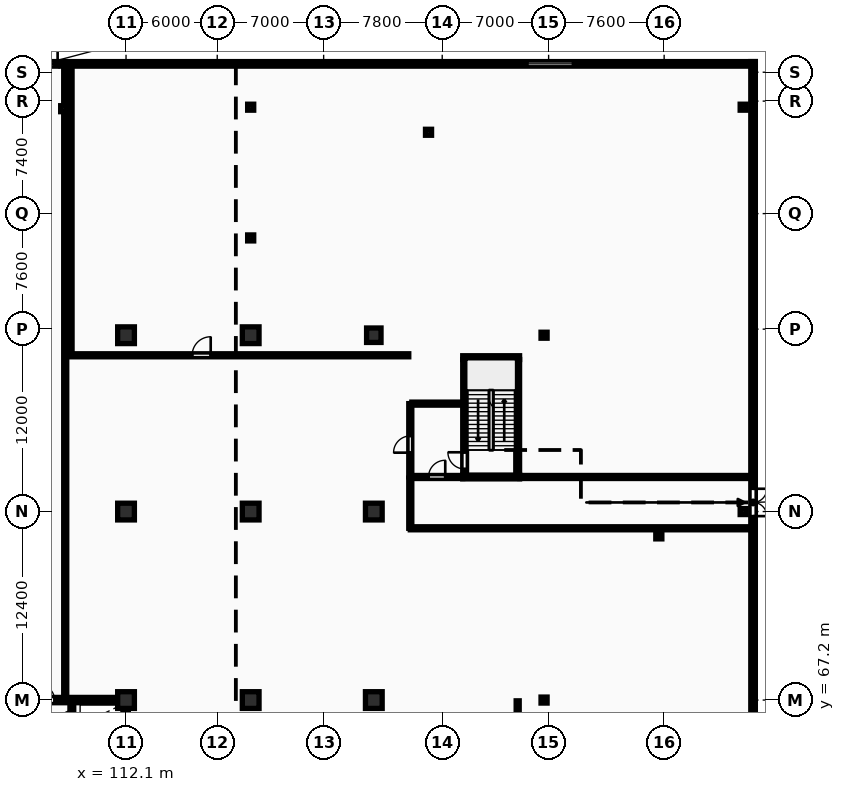
"""IFC4 building model, lengths in metres.
Left out: names, types, materials, properties, quantities, classifications, styles, units other than length and angle.
Written with IfcOpenShell. Run it as: python <this file> out.ifc"""

import sys

from ifc_helpers import new_model, si_unit, direction, frame, frame_2d, origin, origin_2d, place, context, subcontext, project, spatial, rectangle, circle, i_section, extrude, element, fill, save


model = new_model("IFC4")
c1 = context("Model", 3, precision=1e-05, world=origin(), true_north=direction((0.0, 1.0)))
c2 = subcontext(c1, "Body", "Model", "MODEL_VIEW")
j1 = project(units=[si_unit("LENGTHUNIT", "METRE"), si_unit("PLANEANGLEUNIT", "RADIAN")], contexts=[c1])
p1 = place(None, origin())
s1 = spatial("IfcSite", under=j1, at=p1, CompositionType="ELEMENT")
p2 = place(p1, origin())
s2 = spatial("IfcBuilding", under=s1, at=p2, CompositionType="ELEMENT")
p3 = place(p2, origin())
s3 = spatial("IfcBuildingStorey", under=s2, at=p3, CompositionType="ELEMENT", Elevation=0.0)
for number, where, z_axis, x_axis in (
    (1, (112.1, 67.2, 0.0), (0.0, 0.0, 1.0), (1.0, 0.0, 0.0)),
    (2, (112.1, 79.6, 0.0), (0.0, 0.0, 1.0), (1.0, 0.0, 0.0)),
    (3, (112.1, 91.2, 0.0), (0.0, 0.0, 1.0), (1.0, 0.0, 0.0)),
    (4, (120.3, 67.2, 0.0), (0.0, 0.0, 1.0), (1.0, 0.0, 0.0)),
    (5, (120.3, 79.6, 0.0), (0.0, 0.0, 1.0), (1.0, 0.0, 0.0)),
    (6, (120.3, 91.2, 0.0), (0.0, 0.0, 1.0), (1.0, 0.0, 0.0)),
    (7, (128.4, 67.2, 0.0), (0.0, 0.0, 1.0), (1.0, 0.0, 0.0)),
    (8, (128.4, 79.6, 0.0), (0.0, 0.0, 1.0), (1.0, 0.0, 0.0)),
):
    element("IfcColumn", number, at=place(p3, frame(where, z_axis=z_axis, x_axis=x_axis)), inside=s3, PredefinedType="COLUMN", context=c2, shape_type="SweptSolid", body=[
        extrude(rectangle(XDim=1.1, YDim=1.1, at=origin_2d()), origin(), (0.0, 0.0, 1.0), 5.4),
    ])
p4 = place(p3, frame((128.4, 91.2, 0.0), z_axis=(0.0, 0.0, 1.0), x_axis=(1.0, 0.0, 0.0)))
e9 = element("IfcColumn", 9, at=p4, inside=s3, PredefinedType="COLUMN", context=c2, shape_type="SweptSolid", body=[
    extrude(circle(Radius=0.475, at=origin_2d()), origin(), (0.0, 0.0, 1.0), 5.4),
])
for number, where, z_axis, x_axis in (
    (10, (139.6, 67.2, 0.0), (0.0, 0.0, 1.0), (1.0, 0.0, 0.0)),
    (11, (139.6, 91.2, 0.0), (0.0, 0.0, 1.0), (1.0, 0.0, 0.0)),
    (12, (120.3, 97.6, 0.0), (0.0, 0.0, 1.0), (1.0, 0.0, 0.0)),
    (13, (108.0, 106.1, 0.0), (0.0, 0.0, 1.0), (1.0, 0.0, 0.0)),
    (14, (132.0, 104.55, 0.0), (0.0, 0.0, 1.0), (1.0, 0.0, 0.0)),
    (15, (147.15, 78.0, 0.0), (0.0, 0.0, 1.0), (1.0, 0.0, 0.0)),
    (16, (152.7, 79.6, 0.0), (0.0, 0.0, 1.0), (1.0, 0.0, 0.0)),
    (17, (152.7, 106.2, 0.0), (0.0, 0.0, 1.0), (1.0, 0.0, 0.0)),
    (18, (120.3, 106.2, 0.0), (0.0, 0.0, 1.0), (1.0, 0.0, 0.0)),
):
    element("IfcColumn", number, at=place(p3, frame(where, z_axis=z_axis, x_axis=x_axis)), inside=s3, PredefinedType="COLUMN", context=c2, shape_type="SweptSolid", body=[
        extrude(i_section(OverallWidth=0.399, OverallDepth=0.394, WebThickness=0.023, FlangeThickness=0.037, FilletRadius=0.015, at=origin_2d()), origin(), (0.0, 0.0, 1.0), 5.4),
    ])
p5 = place(p3, frame((153.5, 109.05, 0.0), z_axis=(0.0, 0.0, 1.0), x_axis=(-1.0, 0.0, 0.0)))
e19 = element("IfcWall", 19, at=p5, inside=s3, PredefinedType="STANDARD", context=c2, shape_type="SweptSolid", body=[
    extrude(rectangle(XDim=48.6, YDim=0.3, at=frame_2d((24.3, 0.0))), origin(), (0.0, 0.0, 1.0), 5.1),
])
p6 = place(p5, frame((45.9, 0.0, 0.0)))
e20 = element("IfcOpeningElement", 20, at=p6, cuts=e19, PredefinedType="OPENING", context=c2, shape_type="SweptSolid", body=[
    extrude(rectangle(XDim=1.8, YDim=2.2, at=frame_2d((0.9, 1.1))), frame((0.0, 0.16, 0.0), z_axis=(0.0, -1.0, 0.0), x_axis=(1.0, 0.0, 0.0)), (0.0, 0.0, 1.0), 0.32),
])
p7 = place(p5, frame((12.0, 0.0, 0.9)))
e21 = element("IfcOpeningElement", 21, at=p7, cuts=e19, PredefinedType="OPENING", context=c2, shape_type="SweptSolid", body=[
    extrude(rectangle(XDim=3.0, YDim=2.6, at=frame_2d((1.5, 1.3))), frame((0.0, 0.16, 0.0), z_axis=(0.0, -1.0, 0.0), x_axis=(1.0, 0.0, 0.0)), (0.0, 0.0, 1.0), 0.32),
])
p8 = place(p3, frame((153.35, -26.5, 0.0), z_axis=(0.0, 0.0, 1.0), x_axis=(0.0, 1.0, 0.0)))
e22 = element("IfcWall", 22, at=p8, inside=s3, PredefinedType="STANDARD", context=c2, shape_type="SweptSolid", body=[
    extrude(rectangle(XDim=135.7, YDim=0.3, at=frame_2d((67.85, 0.0))), origin(), (0.0, 0.0, 1.0), 5.1),
])
p9 = place(p8, frame((60.8, 0.0, 0.0)))
e23 = element("IfcOpeningElement", 23, at=p9, cuts=e22, PredefinedType="OPENING", context=c2, shape_type="SweptSolid", body=[
    extrude(rectangle(XDim=7.2, YDim=3.2, at=frame_2d((3.6, 1.6))), frame((0.0, 0.16, 0.0), z_axis=(0.0, -1.0, 0.0), x_axis=(1.0, 0.0, 0.0)), (0.0, 0.0, 1.0), 0.32),
])
p10 = place(p8, frame((70.1, 0.0, 0.0)))
e24 = element("IfcOpeningElement", 24, at=p10, cuts=e22, PredefinedType="OPENING", context=c2, shape_type="SweptSolid", body=[
    extrude(rectangle(XDim=1.8, YDim=2.2, at=frame_2d((0.9, 1.1))), frame((0.0, 0.16, 0.0), z_axis=(0.0, -1.0, 0.0), x_axis=(1.0, 0.0, 0.0)), (0.0, 0.0, 1.0), 0.32),
])
p11 = place(p8, frame((77.5, 0.0, 0.0)))
e25 = element("IfcOpeningElement", 25, at=p11, cuts=e22, PredefinedType="OPENING", context=c2, shape_type="SweptSolid", body=[
    extrude(rectangle(XDim=4.2, YDim=3.6, at=frame_2d((2.1, 1.8))), frame((0.0, 0.16, 0.0), z_axis=(0.0, -1.0, 0.0), x_axis=(1.0, 0.0, 0.0)), (0.0, 0.0, 1.0), 0.32),
])
p12 = place(p8, frame((11.0, 0.0, 0.0)))
e26 = element("IfcOpeningElement", 26, at=p12, cuts=e22, PredefinedType="OPENING", context=c2, shape_type="SweptSolid", body=[
    extrude(rectangle(XDim=1.8, YDim=2.2, at=frame_2d((0.9, 1.1))), frame((0.0, 0.16, 0.0), z_axis=(0.0, -1.0, 0.0), x_axis=(1.0, 0.0, 0.0)), (0.0, 0.0, 1.0), 0.32),
])
p13 = place(p8, frame((105.8, 0.0, 0.0)))
e27 = element("IfcOpeningElement", 27, at=p13, cuts=e22, PredefinedType="OPENING", context=c2, shape_type="SweptSolid", body=[
    extrude(rectangle(XDim=1.8, YDim=2.2, at=frame_2d((0.9, 1.1))), frame((0.0, 0.16, 0.0), z_axis=(0.0, -1.0, 0.0), x_axis=(1.0, 0.0, 0.0)), (0.0, 0.0, 1.0), 0.32),
])
p14 = place(p3, frame((112.075, 55.375, 0.0), z_axis=(0.0, 0.0, 1.0), x_axis=(0.0, 1.0, 0.0)))
e28 = element("IfcWall", 28, at=p14, inside=s3, PredefinedType="SHEAR", context=c2, shape_type="SweptSolid", body=[
    extrude(rectangle(XDim=11.65, YDim=0.35, at=frame_2d((5.825, 0.0))), origin(), (0.0, 0.0, 1.0), 5.4),
])
p15 = place(p3, frame((75.95, 67.2, 0.0), z_axis=(0.0, 0.0, 1.0), x_axis=(1.0, 0.0, 0.0)))
e29 = element("IfcWall", 29, at=p15, inside=s3, PredefinedType="SHEAR", context=c2, shape_type="SweptSolid", body=[
    extrude(rectangle(XDim=36.3, YDim=0.35, at=frame_2d((18.15, 0.0))), origin(), (0.0, 0.0, 1.0), 5.4),
])
p16 = place(p15, frame((5.25, 0.0, 0.0)))
e30 = element("IfcOpeningElement", 30, at=p16, cuts=e29, PredefinedType="OPENING", context=c2, shape_type="SweptSolid", body=[
    extrude(rectangle(XDim=1.0, YDim=2.15, at=frame_2d((0.5, 1.075))), frame((0.0, 0.185, 0.0), z_axis=(0.0, -1.0, 0.0), x_axis=(1.0, 0.0, 0.0)), (0.0, 0.0, 1.0), 0.37),
])
p17 = place(p15, frame((21.6, 0.0, 0.0)))
e31 = element("IfcOpeningElement", 31, at=p17, cuts=e29, PredefinedType="OPENING", context=c2, shape_type="SweptSolid", body=[
    extrude(rectangle(XDim=1.5, YDim=2.2, at=frame_2d((0.75, 1.1))), frame((0.0, 0.185, 0.0), z_axis=(0.0, -1.0, 0.0), x_axis=(1.0, 0.0, 0.0)), (0.0, 0.0, 1.0), 0.37),
])
p18 = place(p15, frame((30.45, 0.0, 0.0)))
e32 = element("IfcOpeningElement", 32, at=p18, cuts=e29, PredefinedType="OPENING", context=c2, shape_type="SweptSolid", body=[
    extrude(rectangle(XDim=1.0, YDim=2.15, at=frame_2d((0.5, 1.075))), frame((0.0, 0.185, 0.0), z_axis=(0.0, -1.0, 0.0), x_axis=(1.0, 0.0, 0.0)), (0.0, 0.0, 1.0), 0.37),
])
p19 = place(p3, frame((108.535, 55.4, 0.0), z_axis=(0.0, 0.0, 1.0), x_axis=(0.0, 1.0, 0.0)))
e33 = element("IfcWall", 33, at=p19, inside=s3, PredefinedType="SHEAR", context=c2, shape_type="SweptSolid", body=[
    extrude(rectangle(XDim=11.6, YDim=0.25, at=frame_2d((5.8, 0.0))), origin(), (0.0, 0.0, 1.0), 5.4),
])
p20 = place(p19, frame((8.2, 0.0, 0.0)))
e34 = element("IfcOpeningElement", 34, at=p20, cuts=e33, PredefinedType="OPENING", context=c2, shape_type="SweptSolid", body=[
    extrude(rectangle(XDim=1.1, YDim=2.1, at=frame_2d((0.55, 1.05))), frame((0.0, 0.135, 0.0), z_axis=(0.0, -1.0, 0.0), x_axis=(1.0, 0.0, 0.0)), (0.0, 0.0, 1.0), 0.27),
])
p21 = place(p19, frame((10.25, 0.0, 0.0)))
e35 = element("IfcOpeningElement", 35, at=p21, cuts=e33, PredefinedType="OPENING", context=c2, shape_type="SweptSolid", body=[
    extrude(rectangle(XDim=0.85, YDim=2.05, at=frame_2d((0.425, 1.025))), frame((0.0, 0.135, 0.0), z_axis=(0.0, -1.0, 0.0), x_axis=(1.0, 0.0, 0.0)), (0.0, 0.0, 1.0), 0.27),
])
p22 = place(p3, frame((134.375, 82.0, 0.0), z_axis=(0.0, 0.0, 1.0), x_axis=(0.0, 1.0, 0.0)))
e36 = element("IfcWall", 36, at=p22, inside=s3, PredefinedType="SHEAR", context=c2, shape_type="SweptSolid", body=[
    extrude(rectangle(XDim=7.6, YDim=0.25, at=frame_2d((3.8, 0.0))), origin(), (0.0, 0.0, 1.0), 5.4),
])
p23 = place(p22, frame((0.4, 0.0, 0.0)))
e37 = element("IfcOpeningElement", 37, at=p23, cuts=e36, PredefinedType="OPENING", context=c2, shape_type="SweptSolid", body=[
    extrude(rectangle(XDim=1.1, YDim=2.1, at=frame_2d((0.55, 1.05))), frame((0.0, 0.135, 0.0), z_axis=(0.0, -1.0, 0.0), x_axis=(1.0, 0.0, 0.0)), (0.0, 0.0, 1.0), 0.27),
])
p24 = place(p3, frame((137.865, 82.0, 0.0), z_axis=(0.0, 0.0, 1.0), x_axis=(0.0, 1.0, 0.0)))
e38 = element("IfcWall", 38, at=p24, inside=s3, PredefinedType="SHEAR", context=c2, shape_type="SweptSolid", body=[
    extrude(rectangle(XDim=7.6, YDim=0.25, at=frame_2d((3.8, 0.0))), origin(), (0.0, 0.0, 1.0), 5.4),
])
for number, where, z_axis, x_axis in (
    (39, (134.25, 81.875, 0.0), (0.0, 0.0, 1.0), (1.0, 0.0, 0.0)),
    (40, (134.25, 89.725, 0.0), (0.0, 0.0, 1.0), (1.0, 0.0, 0.0)),
):
    element("IfcWall", number, at=place(p3, frame(where, z_axis=z_axis, x_axis=x_axis)), inside=s3, PredefinedType="SHEAR", context=c2, shape_type="SweptSolid", body=[
        extrude(rectangle(XDim=3.74, YDim=0.25, at=frame_2d((1.87, 0.0))), origin(), (0.0, 0.0, 1.0), 5.4),
    ])
p25 = place(p3, frame((130.8, 81.875, 0.0), z_axis=(0.0, 0.0, 1.0), x_axis=(0.0, 1.0, 0.0)))
e41 = element("IfcWall", 41, at=p25, inside=s3, PredefinedType="PARTITIONING", context=c2, shape_type="SweptSolid", body=[
    extrude(rectangle(XDim=4.825, YDim=0.2, at=frame_2d((2.413, 0.0))), origin(), (0.0, 0.0, 1.0), 5.1),
])
p26 = place(p25, frame((1.6, 0.0, 0.0)))
e42 = element("IfcOpeningElement", 42, at=p26, cuts=e41, PredefinedType="OPENING", context=c2, shape_type="SweptSolid", body=[
    extrude(rectangle(XDim=1.1, YDim=2.15, at=frame_2d((0.55, 1.075))), frame((0.0, 0.11, 0.0), z_axis=(0.0, -1.0, 0.0), x_axis=(1.0, 0.0, 0.0)), (0.0, 0.0, 1.0), 0.22),
])
p27 = place(p3, frame((130.9, 81.875, 0.0), z_axis=(0.0, 0.0, 1.0), x_axis=(1.0, 0.0, 0.0)))
e43 = element("IfcWall", 43, at=p27, inside=s3, PredefinedType="PARTITIONING", context=c2, shape_type="SweptSolid", body=[
    extrude(rectangle(XDim=3.35, YDim=0.2, at=frame_2d((1.675, 0.0))), origin(), (0.0, 0.0, 1.0), 5.1),
])
p28 = place(p27, frame((1.1, 0.0, 0.0)))
e44 = element("IfcOpeningElement", 44, at=p28, cuts=e43, PredefinedType="OPENING", context=c2, shape_type="SweptSolid", body=[
    extrude(rectangle(XDim=1.1, YDim=2.1, at=frame_2d((0.55, 1.05))), frame((0.0, 0.11, 0.0), z_axis=(0.0, -1.0, 0.0), x_axis=(1.0, 0.0, 0.0)), (0.0, 0.0, 1.0), 0.22),
])
p29 = place(p3, frame((130.9, 86.7, 0.0), z_axis=(0.0, 0.0, 1.0), x_axis=(1.0, 0.0, 0.0)))
e45 = element("IfcWall", 45, at=p29, inside=s3, PredefinedType="PARTITIONING", context=c2, shape_type="SweptSolid", body=[
    extrude(rectangle(XDim=3.35, YDim=0.2, at=frame_2d((1.675, 0.0))), origin(), (0.0, 0.0, 1.0), 5.1),
])
p30 = place(p3, frame((108.1, 67.45, 0.0), z_axis=(0.0, 0.0, 1.0), x_axis=(0.0, 1.0, 0.0)))
e46 = element("IfcWall", 46, at=p30, inside=s3, PredefinedType="PARTITIONING", context=c2, shape_type="SweptSolid", body=[
    extrude(rectangle(XDim=41.45, YDim=0.2, at=frame_2d((20.725, 0.0))), origin(), (0.0, 0.0, 1.0), 5.1),
])
p31 = place(p3, frame((130.8, 78.5, 0.0), z_axis=(0.0, 0.0, 1.0), x_axis=(1.0, 0.0, 0.0)))
e47 = element("IfcWall", 47, at=p31, inside=s3, PredefinedType="PARTITIONING", context=c2, shape_type="SweptSolid", body=[
    extrude(rectangle(XDim=22.4, YDim=0.2, at=frame_2d((11.2, 0.0))), origin(), (0.0, 0.0, 1.0), 5.1),
])
p32 = place(p3, frame((138.0, 81.875, 0.0), z_axis=(0.0, 0.0, 1.0), x_axis=(1.0, 0.0, 0.0)))
e48 = element("IfcWall", 48, at=p32, inside=s3, PredefinedType="PARTITIONING", context=c2, shape_type="SweptSolid", body=[
    extrude(rectangle(XDim=15.2, YDim=0.2, at=frame_2d((7.6, 0.0))), origin(), (0.0, 0.0, 1.0), 5.1),
])
p33 = place(p3, frame((130.8, 78.5, 0.0), z_axis=(0.0, 0.0, 1.0), x_axis=(0.0, 1.0, 0.0)))
e49 = element("IfcWall", 49, at=p33, inside=s3, PredefinedType="PARTITIONING", context=c2, shape_type="SweptSolid", body=[
    extrude(rectangle(XDim=3.3, YDim=0.2, at=frame_2d((1.65, 0.0))), origin(), (0.0, 0.0, 1.0), 5.1),
])
p34 = place(p3, frame((137.865, 50.85, 0.0), z_axis=(0.0, 0.0, 1.0), x_axis=(0.0, 1.0, 0.0)))
e50 = element("IfcWall", 50, at=p34, inside=s3, PredefinedType="PARTITIONING", context=c2, shape_type="SweptSolid", body=[
    extrude(rectangle(XDim=16.3, YDim=0.2, at=frame_2d((8.15, 0.0))), origin(), (0.0, 0.0, 1.0), 5.1),
])
p35 = place(p34, frame((6.5, 0.0, 0.0)))
e51 = element("IfcOpeningElement", 51, at=p35, cuts=e50, PredefinedType="OPENING", context=c2, shape_type="SweptSolid", body=[
    extrude(rectangle(XDim=1.2, YDim=2.15, at=frame_2d((0.6, 1.075))), frame((0.0, 0.11, 0.0), z_axis=(0.0, -1.0, 0.0), x_axis=(1.0, 0.0, 0.0)), (0.0, 0.0, 1.0), 0.22),
])
p36 = place(p3, frame((108.45, 89.88, 0.0), z_axis=(0.0, 0.0, 1.0), x_axis=(1.0, 0.0, 0.0)))
e52 = element("IfcWall", 52, at=p36, inside=s3, PredefinedType="PARTITIONING", context=c2, shape_type="SweptSolid", body=[
    extrude(rectangle(XDim=22.25, YDim=0.2, at=frame_2d((11.125, 0.0))), origin(), (0.0, 0.0, 1.0), 5.1),
])
p37 = place(p36, frame((8.0, 0.0, 0.0)))
e53 = element("IfcOpeningElement", 53, at=p37, cuts=e52, PredefinedType="OPENING", context=c2, shape_type="SweptSolid", body=[
    extrude(rectangle(XDim=1.22, YDim=2.18, at=frame_2d((0.61, 1.09))), frame((0.0, 0.11, 0.0), z_axis=(0.0, -1.0, 0.0), x_axis=(1.0, 0.0, 0.0)), (0.0, 0.0, 1.0), 0.22),
])
p38 = place(p3, frame((108.45, 89.88, 0.0), z_axis=(0.0, 0.0, 1.0), x_axis=(0.0, 1.0, 0.0)))
e54 = element("IfcWall", 54, at=p38, inside=s3, PredefinedType="PARTITIONING", context=c2, shape_type="SweptSolid", body=[
    extrude(rectangle(XDim=19.07, YDim=0.2, at=frame_2d((9.535, 0.0))), origin(), (0.0, 0.0, 1.0), 5.1),
])
p39 = place(p6, frame((1.8, 0.0, 0.0), z_axis=(0.0, 0.0, 1.0), x_axis=(-1.0, 0.0, 0.0)))
e55 = element("IfcDoor", 55, at=p39, inside=s3, OperationType="DOUBLE_DOOR_SINGLE_SWING", PredefinedType="DOOR", context=c2, shape_type="SweptSolid", body=[
    extrude(rectangle(XDim=1.8, YDim=2.2, at=frame_2d((0.9, 1.1))), frame((0.0, 0.025, 0.0), z_axis=(0.0, -1.0, 0.0), x_axis=(1.0, 0.0, 0.0)), (0.0, 0.0, 1.0), 0.05),
])
fill(e20, e55)
p40 = place(p7, origin())
e56 = element("IfcWindow", 56, at=p40, inside=s3, PartitioningType="TRIPLE_PANEL_VERTICAL", PredefinedType="WINDOW", context=c2, shape_type="SweptSolid", body=[
    extrude(rectangle(XDim=3.0, YDim=2.6, at=frame_2d((1.5, 1.3))), frame((0.0, 0.03, 0.0), z_axis=(0.0, -1.0, 0.0), x_axis=(1.0, 0.0, 0.0)), (0.0, 0.0, 1.0), 0.06),
])
fill(e21, e56)
p41 = place(p13, frame((1.8, 0.0, 0.0), z_axis=(0.0, 0.0, 1.0), x_axis=(-1.0, 0.0, 0.0)))
e57 = element("IfcDoor", 57, at=p41, inside=s3, OperationType="DOUBLE_DOOR_SINGLE_SWING", PredefinedType="DOOR", context=c2, shape_type="SweptSolid", body=[
    extrude(rectangle(XDim=1.8, YDim=2.2, at=frame_2d((0.9, 1.1))), frame((0.0, 0.025, 0.0), z_axis=(0.0, -1.0, 0.0), x_axis=(1.0, 0.0, 0.0)), (0.0, 0.0, 1.0), 0.05),
])
fill(e27, e57)
p42 = place(p18, origin())
e58 = element("IfcDoor", 58, at=p42, inside=s3, OperationType="SINGLE_SWING_LEFT", PredefinedType="DOOR", context=c2, shape_type="SweptSolid", body=[
    extrude(rectangle(XDim=1.0, YDim=2.15, at=frame_2d((0.5, 1.075))), frame((0.0, 0.025, 0.0), z_axis=(0.0, -1.0, 0.0), x_axis=(1.0, 0.0, 0.0)), (0.0, 0.0, 1.0), 0.05),
])
fill(e32, e58)
p43 = place(p21, origin())
e59 = element("IfcDoor", 59, at=p43, inside=s3, OperationType="SINGLE_SWING_LEFT", PredefinedType="DOOR", context=c2, shape_type="SweptSolid", body=[
    extrude(rectangle(XDim=0.85, YDim=2.05, at=frame_2d((0.425, 1.025))), frame((0.0, 0.025, 0.0), z_axis=(0.0, -1.0, 0.0), x_axis=(1.0, 0.0, 0.0)), (0.0, 0.0, 1.0), 0.05),
])
fill(e35, e59)
p44 = place(p23, origin())
e60 = element("IfcDoor", 60, at=p44, inside=s3, OperationType="SINGLE_SWING_RIGHT", PredefinedType="DOOR", context=c2, shape_type="SweptSolid", body=[
    extrude(rectangle(XDim=1.1, YDim=2.1, at=frame_2d((0.55, 1.05))), frame((0.0, 0.025, 0.0), z_axis=(0.0, -1.0, 0.0), x_axis=(1.0, 0.0, 0.0)), (0.0, 0.0, 1.0), 0.05),
])
fill(e37, e60)
p45 = place(p26, origin())
e61 = element("IfcDoor", 61, at=p45, inside=s3, OperationType="SINGLE_SWING_LEFT", PredefinedType="DOOR", context=c2, shape_type="SweptSolid", body=[
    extrude(rectangle(XDim=1.1, YDim=2.15, at=frame_2d((0.55, 1.075))), frame((0.0, 0.025, 0.0), z_axis=(0.0, -1.0, 0.0), x_axis=(1.0, 0.0, 0.0)), (0.0, 0.0, 1.0), 0.05),
])
fill(e42, e61)
p46 = place(p28, origin())
e62 = element("IfcDoor", 62, at=p46, inside=s3, OperationType="SINGLE_SWING_RIGHT", PredefinedType="DOOR", context=c2, shape_type="SweptSolid", body=[
    extrude(rectangle(XDim=1.1, YDim=2.1, at=frame_2d((0.55, 1.05))), frame((0.0, 0.025, 0.0), z_axis=(0.0, -1.0, 0.0), x_axis=(1.0, 0.0, 0.0)), (0.0, 0.0, 1.0), 0.05),
])
fill(e44, e62)
p47 = place(p37, origin())
e63 = element("IfcDoor", 63, at=p47, inside=s3, OperationType="SINGLE_SWING_RIGHT", PredefinedType="DOOR", context=c2, shape_type="SweptSolid", body=[
    extrude(rectangle(XDim=1.22, YDim=2.18, at=frame_2d((0.61, 1.09))), frame((0.0, 0.025, 0.0), z_axis=(0.0, -1.0, 0.0), x_axis=(1.0, 0.0, 0.0)), (0.0, 0.0, 1.0), 0.05),
])
fill(e53, e63)
save(model, sys.argv[1])
